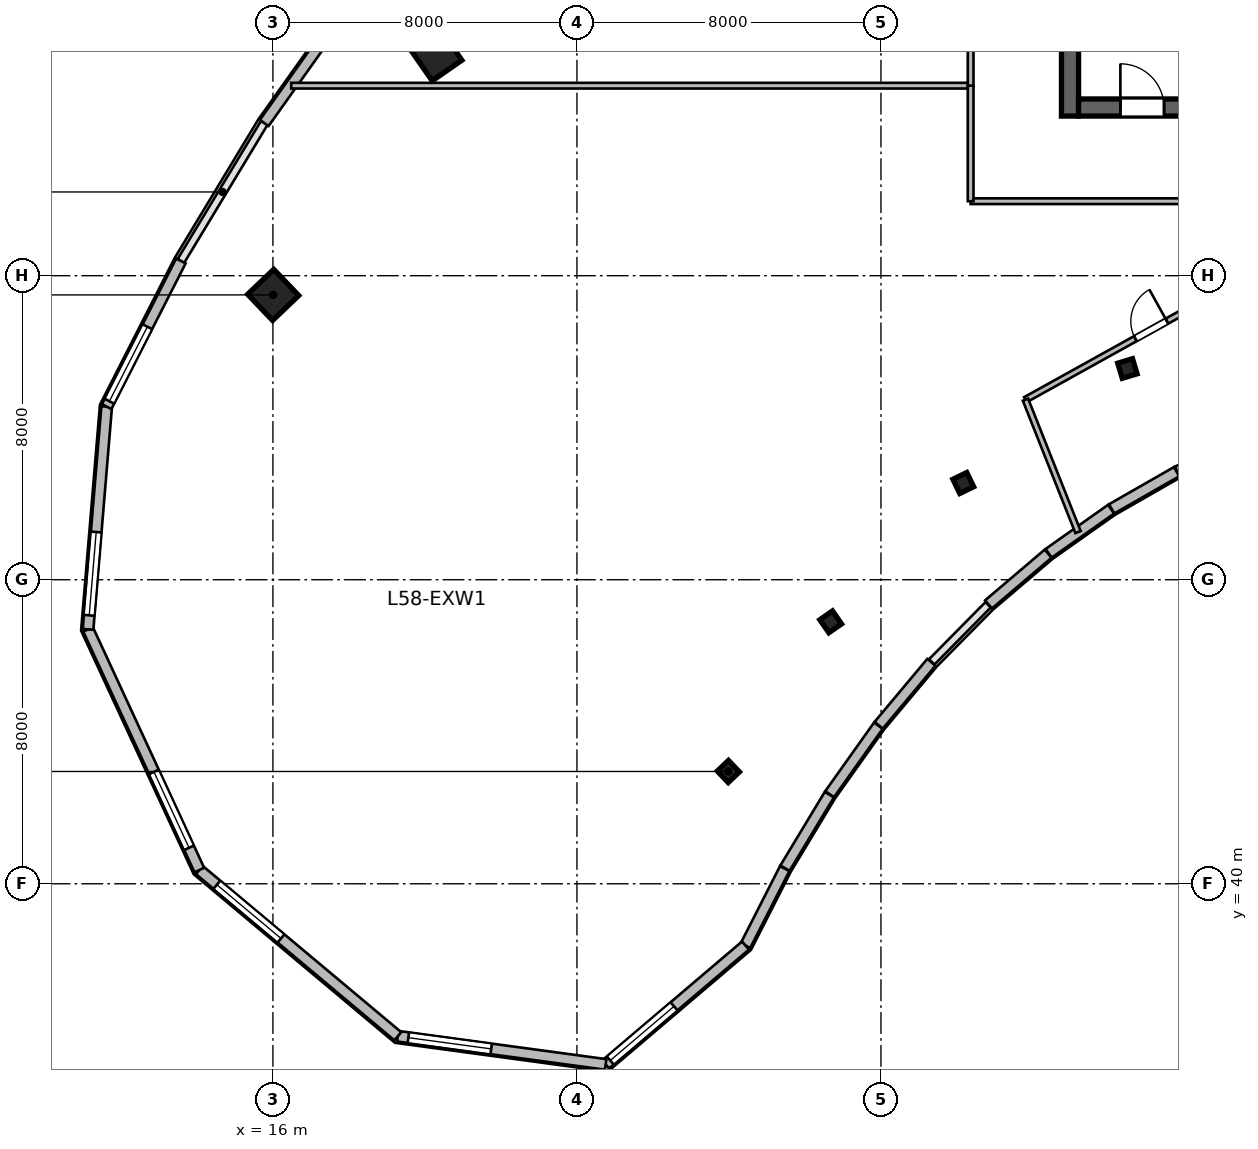
"""IFC4 building model, lengths in metres.
Left out: names, types, materials, properties, quantities, classifications, styles, units other than length and angle.
Written with IfcOpenShell. Run it as: python <this file> out.ifc"""

import sys

from ifc_helpers import new_model, si_unit, direction, frame, frame_2d, origin, origin_2d, place, context, subcontext, project, spatial, rectangle, i_section, extrude, source, transform, mapped, element, fill, save


model = new_model("IFC4")
c1 = context("Model", 3, precision=1e-05, world=origin(), true_north=direction((0.0, 1.0)))
c2 = subcontext(c1, "Body", "Model", "MODEL_VIEW")
j1 = project(units=[si_unit("LENGTHUNIT", "METRE"), si_unit("PLANEANGLEUNIT", "RADIAN")], contexts=[c1])
p1 = place(None, origin())
s1 = spatial("IfcSite", under=j1, at=p1, CompositionType="ELEMENT")
p2 = place(p1, origin())
s2 = spatial("IfcBuilding", under=s1, at=p2, CompositionType="ELEMENT")
p3 = place(p2, frame((0.0, 0.0, 239.1)))
s3 = spatial("IfcBuildingStorey", under=s2, at=p3, CompositionType="ELEMENT", Elevation=239.1)
m1 = source(origin(), c2, "Body", "SweptSolid", [
    extrude(rectangle(XDim=12.0, YDim=0.45, at=frame_2d((6.0, 0.0))), origin(), (0.0, 0.0, 1.0), 3.9),
])
p4 = place(p3, frame((36.975, 60.2, 0.0), z_axis=(0.0, 0.0, 1.0), x_axis=(0.0, 1.0, 0.0)))
e1 = element("IfcWall", 1, at=p4, inside=s3, PredefinedType="SHEAR", context=c2, shape_type="MappedRepresentation", body=[
    mapped(m1, transform((0.0, 0.0, 0.0), scale=1.0)),
])
m2 = source(origin(), c2, "Body", "SweptSolid", [
    extrude(rectangle(XDim=21.6, YDim=0.45, at=frame_2d((10.8, 0.0))), origin(), (0.0, 0.0, 1.0), 3.9),
])
p5 = place(p3, frame((37.2, 60.425, 0.0), z_axis=(0.0, 0.0, 1.0), x_axis=(1.0, 0.0, 0.0)))
e2 = element("IfcWall", 2, at=p5, inside=s3, PredefinedType="SHEAR", context=c2, shape_type="MappedRepresentation", body=[
    mapped(m2, transform((0.0, 0.0, 0.0), scale=1.0)),
])
p6 = place(p5, frame((1.1, 0.0, 0.0)))
e3 = element("IfcOpeningElement", 3, at=p6, cuts=e2, PredefinedType="OPENING", context=c2, shape_type="SweptSolid", body=[
    extrude(rectangle(XDim=1.15, YDim=2.15, at=frame_2d((0.575, 1.075))), frame((0.0, 0.235, 0.0), z_axis=(0.0, -1.0, 0.0), x_axis=(1.0, 0.0, 0.0)), (0.0, 0.0, 1.0), 0.47),
])
p7 = place(p5, frame((19.5, 0.0, 0.0)))
e4 = element("IfcOpeningElement", 4, at=p7, cuts=e2, PredefinedType="OPENING", context=c2, shape_type="SweptSolid", body=[
    extrude(rectangle(XDim=0.9, YDim=2.1, at=frame_2d((0.45, 1.05))), frame((0.0, 0.235, 0.0), z_axis=(0.0, -1.0, 0.0), x_axis=(1.0, 0.0, 0.0)), (0.0, 0.0, 1.0), 0.47),
])
p8 = place(p5, frame((12.02, 0.0, 0.0)))
e5 = element("IfcOpeningElement", 5, at=p8, cuts=e2, PredefinedType="OPENING", context=c2, shape_type="SweptSolid", body=[
    extrude(rectangle(XDim=1.6, YDim=2.15, at=frame_2d((0.8, 1.075))), frame((0.0, 0.235, 0.0), z_axis=(0.0, -1.0, 0.0), x_axis=(1.0, 0.0, 0.0)), (0.0, 0.0, 1.0), 0.47),
])
m3 = source(origin(), c2, "Body", "SweptSolid", [
    extrude(i_section(OverallWidth=0.406, OverallDepth=0.416, WebThickness=0.03, FlangeThickness=0.048, at=origin_2d()), origin(), (0.0, 0.0, 1.0), 3.9),
])
p9 = place(p3, frame((27.985, 42.955, 0.0), z_axis=(0.0, 0.0, 1.0), x_axis=(-0.690756218984, 0.723087716626, 0.0)))
e6 = element("IfcColumn", 6, at=p9, inside=s3, PredefinedType="COLUMN", context=c2, shape_type="MappedRepresentation", body=[
    mapped(m3, transform((0.0, 0.0, 0.0), scale=1.0)),
])
m4 = source(origin(), c2, "Body", "SweptSolid", [
    extrude(rectangle(XDim=0.95, YDim=0.95, at=origin_2d()), origin(), (0.0, 0.0, 1.0), 3.9),
])
p10 = place(p3, frame((16.007, 55.494, 0.0), z_axis=(0.0, 0.0, 1.0), x_axis=(-0.690756218984, 0.723087716626, 0.0)))
e7 = element("IfcColumn", 7, at=p10, inside=s3, PredefinedType="COLUMN", context=c2, shape_type="MappedRepresentation", body=[
    mapped(m4, transform((0.0, 0.0, 0.0), scale=1.0)),
])
p11 = place(p3, frame((30.677, 46.892, 0.0), z_axis=(0.0, 0.0, 1.0), x_axis=(-0.571143442153, 0.820850271661, 0.0)))
e8 = element("IfcColumn", 8, at=p11, inside=s3, PredefinedType="COLUMN", context=c2, shape_type="MappedRepresentation", body=[
    mapped(m3, transform((0.0, 0.0, 0.0), scale=1.0)),
])
p12 = place(p3, frame((20.311, 61.789, 0.0), z_axis=(0.0, 0.0, 1.0), x_axis=(-0.571143442153, 0.820850271661, 0.0)))
e9 = element("IfcColumn", 9, at=p12, inside=s3, PredefinedType="COLUMN", context=c2, shape_type="MappedRepresentation", body=[
    mapped(m4, transform((0.0, 0.0, 0.0), scale=1.0)),
])
for number, where, z_axis, x_axis in (
    (10, (34.166, 50.545, 0.0), (0.0, 0.0, 1.0), (-0.436, 0.9, 0.0)),
    (11, (38.485, 53.558, 0.0), (0.0, 0.0, 1.0), (-0.289, 0.957, 0.0)),
):
    element("IfcColumn", number, at=place(p3, frame(where, z_axis=z_axis, x_axis=x_axis)), inside=s3, PredefinedType="COLUMN", context=c2, shape_type="MappedRepresentation", body=[
        mapped(m3, transform((0.0, 0.0, 0.0), scale=1.0)),
    ])
m5 = source(origin(), c2, "Body", "SweptSolid", [
    extrude(rectangle(XDim=1.931, YDim=0.28, at=frame_2d((0.965, 0.0))), origin(), (0.0, 0.0, 1.0), 3.65),
])
p13 = place(p3, frame((41.557, 51.639, 0.0), z_axis=(0.0, 0.0, 1.0), x_axis=(-0.912681759743, -0.408671023481, 0.0)))
e12 = element("IfcWall", 12, at=p13, inside=s3, PredefinedType="SOLIDWALL", context=c2, shape_type="MappedRepresentation", body=[
    mapped(m5, transform((0.0, 0.0, 0.0), scale=1.0)),
])
m6 = source(origin(), c2, "Body", "SweptSolid", [
    extrude(rectangle(XDim=1.969, YDim=0.28, at=frame_2d((0.984, 0.0))), origin(), (0.0, 0.0, 1.0), 3.65),
])
p14 = place(p3, frame((39.779, 50.842, 0.0), z_axis=(0.0, 0.0, 1.0), x_axis=(-0.86797594681, -0.496606238139, 0.0)))
e13 = element("IfcWall", 13, at=p14, inside=s3, PredefinedType="SOLIDWALL", context=c2, shape_type="MappedRepresentation", body=[
    mapped(m6, transform((0.0, 0.0, 0.0), scale=1.0)),
])
m7 = source(origin(), c2, "Body", "SweptSolid", [
    extrude(rectangle(XDim=2.012, YDim=0.28, at=frame_2d((1.006, 0.0))), origin(), (0.0, 0.0, 1.0), 3.65),
])
p15 = place(p3, frame((38.055, 49.855, 0.0), z_axis=(0.0, 0.0, 1.0), x_axis=(-0.817008215805, -0.576626027255, 0.0)))
e14 = element("IfcWall", 14, at=p15, inside=s3, PredefinedType="SOLIDWALL", context=c2, shape_type="MappedRepresentation", body=[
    mapped(m7, transform((0.0, 0.0, 0.0), scale=1.0)),
])
m8 = source(origin(), c2, "Body", "SweptSolid", [
    extrude(rectangle(XDim=2.06, YDim=0.28, at=frame_2d((1.03, 0.0))), origin(), (0.0, 0.0, 1.0), 3.65),
])
p16 = place(p3, frame((36.399, 48.685, 0.0), z_axis=(0.0, 0.0, 1.0), x_axis=(-0.761494573969, -0.648171284319, 0.0)))
e15 = element("IfcWall", 15, at=p16, inside=s3, PredefinedType="SOLIDWALL", context=c2, shape_type="MappedRepresentation", body=[
    mapped(m8, transform((0.0, 0.0, 0.0), scale=1.0)),
])
m9 = source(origin(), c2, "Body", "SweptSolid", [
    extrude(rectangle(XDim=2.161, YDim=0.28, at=frame_2d((1.08, 0.0))), origin(), (0.0, 0.0, 1.0), 3.65),
])
p17 = place(p3, frame((33.327, 45.828, 0.0), z_axis=(0.0, 0.0, 1.0), x_axis=(-0.641794516235, -0.766876651705, 0.0)))
e16 = element("IfcWall", 16, at=p17, inside=s3, PredefinedType="SOLIDWALL", context=c2, shape_type="MappedRepresentation", body=[
    mapped(m9, transform((0.0, 0.0, 0.0), scale=1.0)),
])
m10 = source(origin(), c2, "Body", "SweptSolid", [
    extrude(rectangle(XDim=2.212, YDim=0.28, at=frame_2d((1.106, 0.0))), origin(), (0.0, 0.0, 1.0), 3.65),
])
p18 = place(p3, frame((31.931, 44.159, 0.0), z_axis=(0.0, 0.0, 1.0), x_axis=(-0.579639452819, -0.814873060504, 0.0)))
e17 = element("IfcWall", 17, at=p18, inside=s3, PredefinedType="SOLIDWALL", context=c2, shape_type="MappedRepresentation", body=[
    mapped(m10, transform((0.0, 0.0, 0.0), scale=1.0)),
])
m11 = source(origin(), c2, "Body", "SweptSolid", [
    extrude(rectangle(XDim=2.261, YDim=0.28, at=frame_2d((1.13, 0.0))), origin(), (0.0, 0.0, 1.0), 3.65),
])
p19 = place(p3, frame((30.642, 42.346, 0.0), z_axis=(0.0, 0.0, 1.0), x_axis=(-0.516891494538, -0.856050923062, 0.0)))
e18 = element("IfcWall", 18, at=p19, inside=s3, PredefinedType="SOLIDWALL", context=c2, shape_type="MappedRepresentation", body=[
    mapped(m11, transform((0.0, 0.0, 0.0), scale=1.0)),
])
m12 = source(origin(), c2, "Body", "SweptSolid", [
    extrude(rectangle(XDim=2.271, YDim=0.28, at=frame_2d((1.136, 0.0))), origin(), (0.0, 0.0, 1.0), 3.65),
])
p20 = place(p3, frame((29.467, 40.399, 0.0), z_axis=(0.0, 0.0, 1.0), x_axis=(-0.453993402883, -0.891005044957, 0.0)))
e19 = element("IfcWall", 19, at=p20, inside=s3, PredefinedType="SOLIDWALL", context=c2, shape_type="MappedRepresentation", body=[
    mapped(m12, transform((0.0, 0.0, 0.0), scale=1.0)),
])
m13 = source(origin(), c2, "Body", "SweptSolid", [
    extrude(rectangle(XDim=4.83, YDim=0.28, at=frame_2d((2.415, 0.0))), origin(), (0.0, 0.0, 1.0), 3.65),
])
p21 = place(p3, frame((28.436, 38.375, 0.0), z_axis=(0.0, 0.0, 1.0), x_axis=(-0.761890676316, -0.647705640968, 0.0)))
e20 = element("IfcWall", 20, at=p21, inside=s3, PredefinedType="SOLIDWALL", context=c2, shape_type="MappedRepresentation", body=[
    mapped(m13, transform((0.0, 0.0, 0.0), scale=1.0)),
])
p22 = place(p21, frame((2.47, 0.0, 0.95)))
e21 = element("IfcOpeningElement", 21, at=p22, cuts=e20, PredefinedType="OPENING", context=c2, shape_type="SweptSolid", body=[
    extrude(rectangle(XDim=2.2, YDim=2.1, at=frame_2d((1.1, 1.05))), frame((0.0, 0.15, 0.0), z_axis=(0.0, -1.0, 0.0), x_axis=(1.0, 0.0, 0.0)), (0.0, 0.0, 1.0), 0.3),
])
m14 = source(origin(), c2, "Body", "SweptSolid", [
    extrude(rectangle(XDim=5.52, YDim=0.28, at=frame_2d((2.76, 0.0))), origin(), (0.0, 0.0, 1.0), 3.65),
])
p23 = place(p3, frame((24.756, 35.247, 0.0), z_axis=(0.0, 0.0, 1.0), x_axis=(-0.99093029136, 0.134376923856, 0.0)))
e22 = element("IfcWall", 22, at=p23, inside=s3, PredefinedType="SOLIDWALL", context=c2, shape_type="MappedRepresentation", body=[
    mapped(m14, transform((0.0, 0.0, 0.0), scale=1.0)),
])
p24 = place(p23, frame((3.04, 0.0, 0.95)))
e23 = element("IfcOpeningElement", 23, at=p24, cuts=e22, PredefinedType="OPENING", context=c2, shape_type="SweptSolid", body=[
    extrude(rectangle(XDim=2.2, YDim=2.1, at=frame_2d((1.1, 1.05))), frame((0.0, 0.15, 0.0), z_axis=(0.0, -1.0, 0.0), x_axis=(1.0, 0.0, 0.0)), (0.0, 0.0, 1.0), 0.3),
])
m15 = source(origin(), c2, "Body", "SweptSolid", [
    extrude(rectangle(XDim=6.812, YDim=0.28, at=frame_2d((3.406, 0.0))), origin(), (0.0, 0.0, 1.0), 3.65),
])
p25 = place(p3, frame((19.286, 35.988, 0.0), z_axis=(0.0, 0.0, 1.0), x_axis=(-0.766712133953, 0.641991046394, 0.0)))
e24 = element("IfcWall", 24, at=p25, inside=s3, PredefinedType="SOLIDWALL", context=c2, shape_type="MappedRepresentation", body=[
    mapped(m15, transform((0.0, 0.0, 0.0), scale=1.0)),
])
p26 = place(p25, frame((4.009, 0.0, 0.95)))
e25 = element("IfcOpeningElement", 25, at=p26, cuts=e24, PredefinedType="OPENING", context=c2, shape_type="SweptSolid", body=[
    extrude(rectangle(XDim=2.2, YDim=2.1, at=frame_2d((1.1, 1.05))), frame((0.0, 0.15, 0.0), z_axis=(0.0, -1.0, 0.0), x_axis=(1.0, 0.0, 0.0)), (0.0, 0.0, 1.0), 0.3),
])
m16 = source(origin(), c2, "Body", "SweptSolid", [
    extrude(rectangle(XDim=6.977, YDim=0.28, at=frame_2d((3.488, 0.0))), origin(), (0.0, 0.0, 1.0), 3.65),
])
p27 = place(p3, frame((14.063, 40.362, 0.0), z_axis=(0.0, 0.0, 1.0), x_axis=(-0.41966832263, 0.907677530283, 0.0)))
e26 = element("IfcWall", 26, at=p27, inside=s3, PredefinedType="SOLIDWALL", context=c2, shape_type="MappedRepresentation", body=[
    mapped(m16, transform((0.0, 0.0, 0.0), scale=1.0)),
])
p28 = place(p27, frame((0.644, 0.0, 0.95)))
e27 = element("IfcOpeningElement", 27, at=p28, cuts=e26, PredefinedType="OPENING", context=c2, shape_type="SweptSolid", body=[
    extrude(rectangle(XDim=2.2, YDim=2.1, at=frame_2d((1.1, 1.05))), frame((0.0, 0.15, 0.0), z_axis=(0.0, -1.0, 0.0), x_axis=(1.0, 0.0, 0.0)), (0.0, 0.0, 1.0), 0.3),
])
m17 = source(origin(), c2, "Body", "SweptSolid", [
    extrude(rectangle(XDim=5.881, YDim=0.28, at=frame_2d((2.94, 0.0))), origin(), (0.0, 0.0, 1.0), 3.65),
])
p29 = place(p3, frame((11.135, 46.694, 0.0), z_axis=(0.0, 0.0, 1.0), x_axis=(0.083320333731, 0.996522815588, 0.0)))
e28 = element("IfcWall", 28, at=p29, inside=s3, PredefinedType="SOLIDWALL", context=c2, shape_type="MappedRepresentation", body=[
    mapped(m17, transform((0.0, 0.0, 0.0), scale=1.0)),
])
p30 = place(p29, frame((0.37, 0.0, 0.95)))
e29 = element("IfcOpeningElement", 29, at=p30, cuts=e28, PredefinedType="OPENING", context=c2, shape_type="SweptSolid", body=[
    extrude(rectangle(XDim=2.2, YDim=2.1, at=frame_2d((1.1, 1.05))), frame((0.0, 0.15, 0.0), z_axis=(0.0, -1.0, 0.0), x_axis=(1.0, 0.0, 0.0)), (0.0, 0.0, 1.0), 0.3),
])
m18 = source(origin(), c2, "Body", "SweptSolid", [
    extrude(rectangle(XDim=4.301, YDim=0.28, at=frame_2d((2.151, 0.0))), origin(), (0.0, 0.0, 1.0), 3.65),
])
p31 = place(p3, frame((11.625, 52.555, 0.0), z_axis=(0.0, 0.0, 1.0), x_axis=(0.454011655096, 0.89099574468, 0.0)))
e30 = element("IfcWall", 30, at=p31, inside=s3, PredefinedType="SOLIDWALL", context=c2, shape_type="MappedRepresentation", body=[
    mapped(m18, transform((0.0, 0.0, 0.0), scale=1.0)),
])
p32 = place(p31, frame((0.16, 0.0, 0.95)))
e31 = element("IfcOpeningElement", 31, at=p32, cuts=e30, PredefinedType="OPENING", context=c2, shape_type="SweptSolid", body=[
    extrude(rectangle(XDim=2.2, YDim=2.1, at=frame_2d((1.1, 1.05))), frame((0.0, 0.15, 0.0), z_axis=(0.0, -1.0, 0.0), x_axis=(1.0, 0.0, 0.0)), (0.0, 0.0, 1.0), 0.3),
])
m19 = source(origin(), c2, "Body", "SweptSolid", [
    extrude(rectangle(XDim=4.149, YDim=0.28, at=frame_2d((2.074, 0.0))), origin(), (0.0, 0.0, 1.0), 3.65),
])
p33 = place(p3, frame((15.771, 60.019, 0.0), z_axis=(0.0, 0.0, 1.0), x_axis=(0.579622789827, 0.814884913048, 0.0)))
e32 = element("IfcWall", 32, at=p33, inside=s3, PredefinedType="SOLIDWALL", context=c2, shape_type="MappedRepresentation", body=[
    mapped(m19, transform((0.0, 0.0, 0.0), scale=1.0)),
])
m20 = source(origin(), c2, "Body", "SweptSolid", [
    extrude(rectangle(XDim=5.262, YDim=0.15, at=frame_2d((2.631, 0.0))), origin(), (0.0, 0.0, 1.0), 3.65),
])
p34 = place(p3, frame((35.803, 52.738, 0.0), z_axis=(0.0, 0.0, 1.0), x_axis=(0.874365088288, 0.485268680612, 0.0)))
e33 = element("IfcWall", 33, at=p34, inside=s3, PredefinedType="PARTITIONING", context=c2, shape_type="MappedRepresentation", body=[
    mapped(m20, transform((0.0, 0.0, 0.0), scale=1.0)),
])
p35 = place(p34, frame((3.306, 0.0, 0.0)))
e34 = element("IfcOpeningElement", 34, at=p35, cuts=e33, PredefinedType="OPENING", context=c2, shape_type="SweptSolid", body=[
    extrude(rectangle(XDim=0.95, YDim=2.1, at=frame_2d((0.475, 1.05))), frame((0.0, 0.085, 0.0), z_axis=(0.0, -1.0, 0.0), x_axis=(1.0, 0.0, 0.0)), (0.0, 0.0, 1.0), 0.17),
])
m21 = source(origin(), c2, "Body", "SweptSolid", [
    extrude(rectangle(XDim=3.749, YDim=0.15, at=frame_2d((1.875, 0.0))), origin(), (0.0, 0.0, 1.0), 3.65),
])
p36 = place(p3, frame((37.186, 49.254, 0.0), z_axis=(0.0, 0.0, 1.0), x_axis=(-0.368851771682, 0.92948823044, 0.0)))
e35 = element("IfcWall", 35, at=p36, inside=s3, PredefinedType="PARTITIONING", context=c2, shape_type="MappedRepresentation", body=[
    mapped(m21, transform((0.0, 0.0, 0.0), scale=1.0)),
])
m22 = source(origin(), c2, "Body", "SweptSolid", [
    extrude(rectangle(XDim=12.39, YDim=0.15, at=frame_2d((6.195, 0.0))), origin(), (0.0, 0.0, 1.0), 3.65),
])
p37 = place(p3, frame((34.36, 57.96, 0.0), z_axis=(0.0, 0.0, 1.0), x_axis=(1.0, 0.0, 0.0)))
e36 = element("IfcWall", 36, at=p37, inside=s3, PredefinedType="PARTITIONING", context=c2, shape_type="MappedRepresentation", body=[
    mapped(m22, transform((0.0, 0.0, 0.0), scale=1.0)),
])
m23 = source(origin(), c2, "Body", "SweptSolid", [
    extrude(rectangle(XDim=17.879, YDim=0.15, at=frame_2d((8.939, 0.0))), origin(), (0.0, 0.0, 1.0), 3.65),
])
p38 = place(p3, frame((16.481, 61.0, 0.0), z_axis=(0.0, 0.0, 1.0), x_axis=(1.0, 0.0, 0.0)))
e37 = element("IfcWall", 37, at=p38, inside=s3, PredefinedType="PARTITIONING", context=c2, shape_type="MappedRepresentation", body=[
    mapped(m23, transform((0.0, 0.0, 0.0), scale=1.0)),
])
m24 = source(origin(), c2, "Body", "SweptSolid", [
    extrude(rectangle(XDim=3.04, YDim=0.15, at=frame_2d((1.52, 0.0))), origin(), (0.0, 0.0, 1.0), 3.65),
])
p39 = place(p3, frame((34.36, 57.96, 0.0), z_axis=(0.0, 0.0, 1.0), x_axis=(0.0, 1.0, 0.0)))
e38 = element("IfcWall", 38, at=p39, inside=s3, PredefinedType="PARTITIONING", context=c2, shape_type="MappedRepresentation", body=[
    mapped(m24, transform((0.0, 0.0, 0.0), scale=1.0)),
])
m25 = source(origin(), c2, "Body", "SweptSolid", [
    extrude(rectangle(XDim=3.2, YDim=0.15, at=frame_2d((1.6, 0.0))), origin(), (0.0, 0.0, 1.0), 3.65),
])
p40 = place(p3, frame((34.36, 61.0, 0.0), z_axis=(0.0, 0.0, 1.0), x_axis=(0.0, 1.0, 0.0)))
e39 = element("IfcWall", 39, at=p40, inside=s3, PredefinedType="PARTITIONING", context=c2, shape_type="MappedRepresentation", body=[
    mapped(m25, transform((0.0, 0.0, 0.0), scale=1.0)),
])
p41 = place(p40, frame((1.125, 0.0, 0.0)))
e40 = element("IfcOpeningElement", 40, at=p41, cuts=e39, PredefinedType="OPENING", context=c2, shape_type="SweptSolid", body=[
    extrude(rectangle(XDim=0.95, YDim=2.1, at=frame_2d((0.475, 1.05))), frame((0.0, 0.085, 0.0), z_axis=(0.0, -1.0, 0.0), x_axis=(1.0, 0.0, 0.0)), (0.0, 0.0, 1.0), 0.17),
])
m26 = source(origin(), c2, "Body", "SweptSolid", [
    extrude(rectangle(XDim=2.2, YDim=2.1, at=frame_2d((1.1, 1.05))), frame((0.0, 0.03, 0.0), z_axis=(0.0, -1.0, 0.0), x_axis=(1.0, 0.0, 0.0)), (0.0, 0.0, 1.0), 0.06),
])
p42 = place(p22, origin())
e41 = element("IfcWindow", 41, at=p42, inside=s3, PartitioningType="TRIPLE_PANEL_VERTICAL", PredefinedType="WINDOW", context=c2, shape_type="MappedRepresentation", body=[
    mapped(m26, transform((0.0, 0.0, 0.0), scale=1.0)),
])
fill(e21, e41)
p43 = place(p24, origin())
e42 = element("IfcWindow", 42, at=p43, inside=s3, PartitioningType="TRIPLE_PANEL_VERTICAL", PredefinedType="WINDOW", context=c2, shape_type="MappedRepresentation", body=[
    mapped(m26, transform((0.0, 0.0, 0.0), scale=1.0)),
])
fill(e23, e42)
p44 = place(p26, origin())
e43 = element("IfcWindow", 43, at=p44, inside=s3, PartitioningType="TRIPLE_PANEL_VERTICAL", PredefinedType="WINDOW", context=c2, shape_type="MappedRepresentation", body=[
    mapped(m26, transform((0.0, 0.0, 0.0), scale=1.0)),
])
fill(e25, e43)
p45 = place(p28, origin())
e44 = element("IfcWindow", 44, at=p45, inside=s3, PartitioningType="TRIPLE_PANEL_VERTICAL", PredefinedType="WINDOW", context=c2, shape_type="MappedRepresentation", body=[
    mapped(m26, transform((0.0, 0.0, 0.0), scale=1.0)),
])
fill(e27, e44)
p46 = place(p30, origin())
e45 = element("IfcWindow", 45, at=p46, inside=s3, PartitioningType="TRIPLE_PANEL_VERTICAL", PredefinedType="WINDOW", context=c2, shape_type="MappedRepresentation", body=[
    mapped(m26, transform((0.0, 0.0, 0.0), scale=1.0)),
])
fill(e29, e45)
p47 = place(p32, origin())
e46 = element("IfcWindow", 46, at=p47, inside=s3, PartitioningType="TRIPLE_PANEL_VERTICAL", PredefinedType="WINDOW", context=c2, shape_type="MappedRepresentation", body=[
    mapped(m26, transform((0.0, 0.0, 0.0), scale=1.0)),
])
fill(e31, e46)
m27 = source(origin(), c2, "Body", "SweptSolid", [
    extrude(rectangle(XDim=1.15, YDim=2.15, at=frame_2d((0.575, 1.075))), frame((0.0, 0.025, 0.0), z_axis=(0.0, -1.0, 0.0), x_axis=(1.0, 0.0, 0.0)), (0.0, 0.0, 1.0), 0.05),
])
p48 = place(p6, origin())
e47 = element("IfcDoor", 47, at=p48, inside=s3, OperationType="SINGLE_SWING_LEFT", PredefinedType="DOOR", context=c2, shape_type="MappedRepresentation", body=[
    mapped(m27, transform((0.0, 0.0, 0.0), scale=1.0)),
])
fill(e3, e47)
m28 = source(origin(), c2, "Body", "SweptSolid", [
    extrude(rectangle(XDim=0.95, YDim=2.1, at=frame_2d((0.475, 1.05))), frame((0.0, 0.025, 0.0), z_axis=(0.0, -1.0, 0.0), x_axis=(1.0, 0.0, 0.0)), (0.0, 0.0, 1.0), 0.05),
])
p49 = place(p35, origin())
e48 = element("IfcDoor", 48, at=p49, inside=s3, OperationType="SINGLE_SWING_RIGHT", PredefinedType="DOOR", context=c2, shape_type="MappedRepresentation", body=[
    mapped(m28, transform((0.0, 0.0, 0.0), scale=1.0)),
])
fill(e34, e48)
save(model, sys.argv[1])
